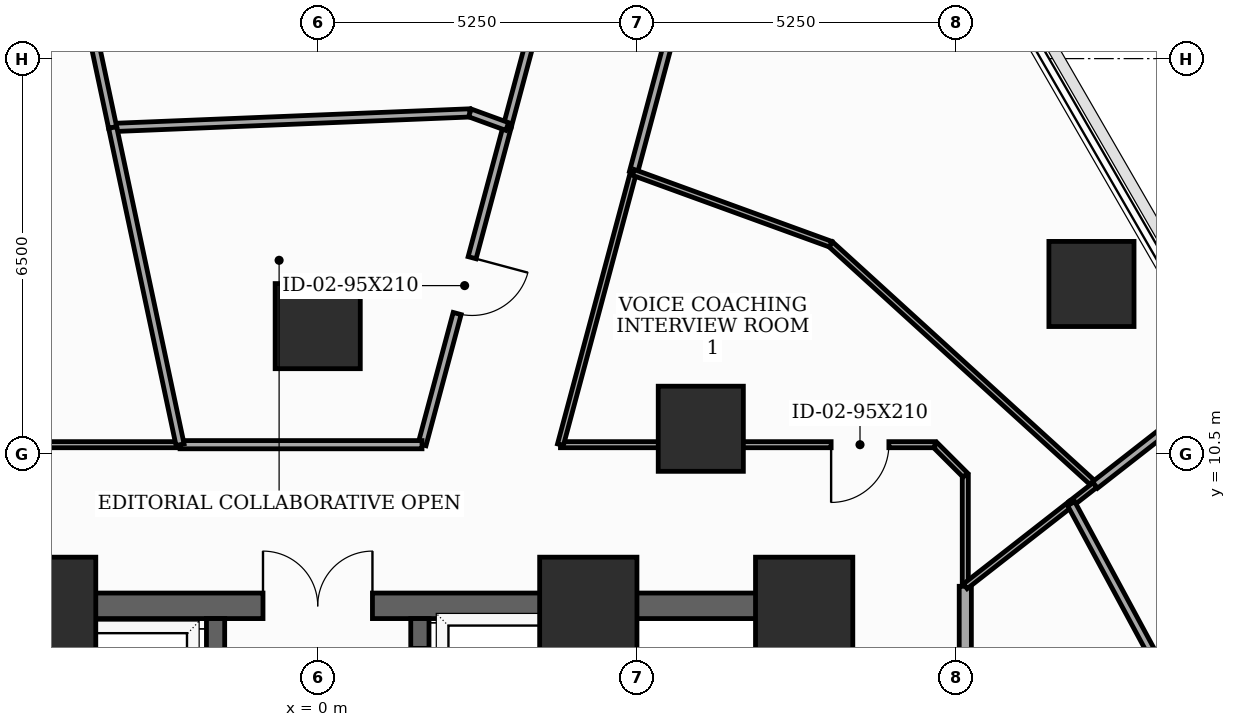
"""IFC4 building model, lengths in metres.
Left out: names, types, materials, properties, quantities, classifications, styles, units other than length and angle.
Written with IfcOpenShell. Run it as: python <this file> out.ifc"""

import sys

from ifc_helpers import new_model, si_unit, direction, frame, frame_2d, origin, origin_2d, place, context, subcontext, project, spatial, rectangle, extrude, element, fill, save


model = new_model("IFC4")
c1 = context("Model", 3, precision=1e-05, world=origin(), true_north=direction((0.0, 1.0)))
c2 = subcontext(c1, "Body", "Model", "MODEL_VIEW")
j1 = project(units=[si_unit("LENGTHUNIT", "METRE"), si_unit("PLANEANGLEUNIT", "RADIAN")], contexts=[c1])
p1 = place(None, origin())
s1 = spatial("IfcSite", under=j1, at=p1, CompositionType="ELEMENT")
p2 = place(p1, origin())
s2 = spatial("IfcBuilding", under=s1, at=p2, CompositionType="ELEMENT")
p3 = place(p2, frame((0.0, 0.0, 48.2)))
s3 = spatial("IfcBuildingStorey", under=s2, at=p3, CompositionType="ELEMENT", Elevation=48.2)
for number, where, z_axis, x_axis in (
    (1, (8.0, 8.0, 0.0), (0.0, 0.0, 1.0), (1.0, 0.0, 0.0)),
    (2, (4.45, 8.0, 0.0), (0.0, 0.0, 1.0), (1.0, 0.0, 0.0)),
    (3, (-4.45, 8.0, 0.0), (0.0, 0.0, 1.0), (1.0, 0.0, 0.0)),
):
    element("IfcColumn", number, at=place(p3, frame(where, z_axis=z_axis, x_axis=x_axis)), inside=s3, PredefinedType="COLUMN", context=c2, shape_type="SweptSolid", body=[
        extrude(rectangle(XDim=1.6, YDim=1.6, at=origin_2d()), origin(), (0.0, 0.0, 1.0), 3.7),
    ])
for number, where, z_axis, x_axis in (
    (4, (6.3, 10.912, 0.0), (0.0, 0.0, 1.0), (1.0, 0.0, 0.0)),
    (5, (0.0, 12.6, 0.0), (0.0, 0.0, 1.0), (1.0, 0.0, 0.0)),
    (6, (12.725, 13.293, 0.0), (0.0, 0.0, 1.0), (1.0, 0.0, 0.0)),
):
    element("IfcColumn", number, at=place(p3, frame(where, z_axis=z_axis, x_axis=x_axis)), inside=s3, PredefinedType="COLUMN", context=c2, shape_type="SweptSolid", body=[
        extrude(rectangle(XDim=1.4, YDim=1.4, at=origin_2d()), origin(), (0.0, 0.0, 1.0), 3.7),
    ])
p4 = place(p3, frame((8.0, -8.0, 0.0), z_axis=(0.0, 0.0, 1.0), x_axis=(0.0, 1.0, 0.0)))
e7 = element("IfcWall", 7, at=p4, inside=s3, PredefinedType="SHEAR", context=c2, shape_type="SweptSolid", body=[
    extrude(rectangle(XDim=16.0, YDim=0.42, at=frame_2d((8.0, 0.0))), origin(), (0.0, 0.0, 1.0), 3.5),
])
p5 = place(p4, frame((9.6, 0.0, 0.0)))
e8 = element("IfcOpeningElement", 8, at=p5, cuts=e7, PredefinedType="OPENING", context=c2, shape_type="SweptSolid", body=[
    extrude(rectangle(XDim=1.05, YDim=2.15, at=frame_2d((0.525, 1.075))), frame((0.0, 0.22, 0.0), z_axis=(0.0, -1.0, 0.0), x_axis=(1.0, 0.0, 0.0)), (0.0, 0.0, 1.0), 0.44),
])
p6 = place(p4, frame((14.148, 0.0, 0.0)))
e9 = element("IfcOpeningElement", 9, at=p6, cuts=e7, PredefinedType="OPENING", context=c2, shape_type="SweptSolid", body=[
    extrude(rectangle(XDim=0.85, YDim=2.02, at=frame_2d((0.425, 1.01))), frame((0.0, 0.22, 0.0), z_axis=(0.0, -1.0, 0.0), x_axis=(1.0, 0.0, 0.0)), (0.0, 0.0, 1.0), 0.44),
])
p7 = place(p3, frame((-8.0, 8.0, 0.0), z_axis=(0.0, 0.0, 1.0), x_axis=(1.0, 0.0, 0.0)))
e10 = element("IfcWall", 10, at=p7, inside=s3, PredefinedType="SHEAR", context=c2, shape_type="SweptSolid", body=[
    extrude(rectangle(XDim=16.0, YDim=0.42, at=frame_2d((8.0, 0.0))), origin(), (0.0, 0.0, 1.0), 3.5),
])
p8 = place(p7, frame((7.1, 0.0, 0.0)))
e11 = element("IfcOpeningElement", 11, at=p8, cuts=e10, PredefinedType="OPENING", context=c2, shape_type="SweptSolid", body=[
    extrude(rectangle(XDim=1.8, YDim=2.15, at=frame_2d((0.9, 1.075))), frame((0.0, 0.22, 0.0), z_axis=(0.0, -1.0, 0.0), x_axis=(1.0, 0.0, 0.0)), (0.0, 0.0, 1.0), 0.44),
])
for number, where, z_axis, x_axis in (
    (12, (-4.45, -7.79, 0.0), (0.0, 0.0, 1.0), (0.0, 1.0, 0.0)),
    (13, (4.45, -7.79, 0.0), (0.0, 0.0, 1.0), (0.0, 1.0, 0.0)),
):
    element("IfcWall", number, at=place(p3, frame(where, z_axis=z_axis, x_axis=x_axis)), inside=s3, PredefinedType="SHEAR", context=c2, shape_type="SweptSolid", body=[
        extrude(rectangle(XDim=15.58, YDim=0.3, at=frame_2d((7.79, 0.0))), origin(), (0.0, 0.0, 1.0), 3.5),
    ])
p9 = place(p3, frame((-1.68, -4.85, 0.0), z_axis=(0.0, 0.0, 1.0), x_axis=(0.0, 1.0, 0.0)))
e14 = element("IfcWall", 14, at=p9, inside=s3, PredefinedType="SHEAR", context=c2, shape_type="SweptSolid", body=[
    extrude(rectangle(XDim=12.64, YDim=0.3, at=frame_2d((6.32, 0.0))), origin(), (0.0, 0.0, 1.0), 3.5),
])
p10 = place(p9, frame((3.95, 0.0, 0.0)))
e15 = element("IfcOpeningElement", 15, at=p10, cuts=e14, PredefinedType="OPENING", context=c2, shape_type="SweptSolid", body=[
    extrude(rectangle(XDim=1.1, YDim=2.1, at=frame_2d((0.55, 1.05))), frame((0.0, 0.16, 0.0), z_axis=(0.0, -1.0, 0.0), x_axis=(1.0, 0.0, 0.0)), (0.0, 0.0, 1.0), 0.32),
])
p11 = place(p9, frame((6.25, 0.0, 0.0)))
e16 = element("IfcOpeningElement", 16, at=p11, cuts=e14, PredefinedType="OPENING", context=c2, shape_type="SweptSolid", body=[
    extrude(rectangle(XDim=1.1, YDim=2.1, at=frame_2d((0.55, 1.05))), frame((0.0, 0.16, 0.0), z_axis=(0.0, -1.0, 0.0), x_axis=(1.0, 0.0, 0.0)), (0.0, 0.0, 1.0), 0.32),
])
p12 = place(p9, frame((8.55, 0.0, 0.0)))
e17 = element("IfcOpeningElement", 17, at=p12, cuts=e14, PredefinedType="OPENING", context=c2, shape_type="SweptSolid", body=[
    extrude(rectangle(XDim=1.1, YDim=2.1, at=frame_2d((0.55, 1.05))), frame((0.0, 0.16, 0.0), z_axis=(0.0, -1.0, 0.0), x_axis=(1.0, 0.0, 0.0)), (0.0, 0.0, 1.0), 0.32),
])
p13 = place(p9, frame((10.85, 0.0, 0.0)))
e18 = element("IfcOpeningElement", 18, at=p13, cuts=e14, PredefinedType="OPENING", context=c2, shape_type="SweptSolid", body=[
    extrude(rectangle(XDim=1.1, YDim=2.1, at=frame_2d((0.55, 1.05))), frame((0.0, 0.16, 0.0), z_axis=(0.0, -1.0, 0.0), x_axis=(1.0, 0.0, 0.0)), (0.0, 0.0, 1.0), 0.32),
])
p14 = place(p9, frame((0.45, 0.0, 0.0)))
e19 = element("IfcOpeningElement", 19, at=p14, cuts=e14, PredefinedType="OPENING", context=c2, shape_type="SweptSolid", body=[
    extrude(rectangle(XDim=0.85, YDim=2.02, at=frame_2d((0.425, 1.01))), frame((0.0, 0.16, 0.0), z_axis=(0.0, -1.0, 0.0), x_axis=(1.0, 0.0, 0.0)), (0.0, 0.0, 1.0), 0.32),
])
p15 = place(p9, frame((2.05, 0.0, 0.0)))
e20 = element("IfcOpeningElement", 20, at=p15, cuts=e14, PredefinedType="OPENING", context=c2, shape_type="SweptSolid", body=[
    extrude(rectangle(XDim=0.85, YDim=2.02, at=frame_2d((0.425, 1.01))), frame((0.0, 0.16, 0.0), z_axis=(0.0, -1.0, 0.0), x_axis=(1.0, 0.0, 0.0)), (0.0, 0.0, 1.0), 0.32),
])
p16 = place(p3, frame((1.68, -4.85, 0.0), z_axis=(0.0, 0.0, 1.0), x_axis=(0.0, 1.0, 0.0)))
e21 = element("IfcWall", 21, at=p16, inside=s3, PredefinedType="SHEAR", context=c2, shape_type="SweptSolid", body=[
    extrude(rectangle(XDim=12.64, YDim=0.3, at=frame_2d((6.32, 0.0))), origin(), (0.0, 0.0, 1.0), 3.5),
])
p17 = place(p16, frame((0.55, 0.0, 0.0)))
e22 = element("IfcOpeningElement", 22, at=p17, cuts=e21, PredefinedType="OPENING", context=c2, shape_type="SweptSolid", body=[
    extrude(rectangle(XDim=1.1, YDim=2.1, at=frame_2d((0.55, 1.05))), frame((0.0, 0.16, 0.0), z_axis=(0.0, -1.0, 0.0), x_axis=(1.0, 0.0, 0.0)), (0.0, 0.0, 1.0), 0.32),
])
p18 = place(p16, frame((2.65, 0.0, 0.0)))
e23 = element("IfcOpeningElement", 23, at=p18, cuts=e21, PredefinedType="OPENING", context=c2, shape_type="SweptSolid", body=[
    extrude(rectangle(XDim=1.1, YDim=2.1, at=frame_2d((0.55, 1.05))), frame((0.0, 0.16, 0.0), z_axis=(0.0, -1.0, 0.0), x_axis=(1.0, 0.0, 0.0)), (0.0, 0.0, 1.0), 0.32),
])
p19 = place(p16, frame((4.75, 0.0, 0.0)))
e24 = element("IfcOpeningElement", 24, at=p19, cuts=e21, PredefinedType="OPENING", context=c2, shape_type="SweptSolid", body=[
    extrude(rectangle(XDim=1.1, YDim=2.1, at=frame_2d((0.55, 1.05))), frame((0.0, 0.16, 0.0), z_axis=(0.0, -1.0, 0.0), x_axis=(1.0, 0.0, 0.0)), (0.0, 0.0, 1.0), 0.32),
])
p20 = place(p16, frame((6.85, 0.0, 0.0)))
e25 = element("IfcOpeningElement", 25, at=p20, cuts=e21, PredefinedType="OPENING", context=c2, shape_type="SweptSolid", body=[
    extrude(rectangle(XDim=1.1, YDim=2.1, at=frame_2d((0.55, 1.05))), frame((0.0, 0.16, 0.0), z_axis=(0.0, -1.0, 0.0), x_axis=(1.0, 0.0, 0.0)), (0.0, 0.0, 1.0), 0.32),
])
p21 = place(p16, frame((8.95, 0.0, 0.0)))
e26 = element("IfcOpeningElement", 26, at=p21, cuts=e21, PredefinedType="OPENING", context=c2, shape_type="SweptSolid", body=[
    extrude(rectangle(XDim=1.1, YDim=2.1, at=frame_2d((0.55, 1.05))), frame((0.0, 0.16, 0.0), z_axis=(0.0, -1.0, 0.0), x_axis=(1.0, 0.0, 0.0)), (0.0, 0.0, 1.0), 0.32),
])
p22 = place(p16, frame((11.05, 0.0, 0.0)))
e27 = element("IfcOpeningElement", 27, at=p22, cuts=e21, PredefinedType="OPENING", context=c2, shape_type="SweptSolid", body=[
    extrude(rectangle(XDim=1.1, YDim=2.1, at=frame_2d((0.55, 1.05))), frame((0.0, 0.16, 0.0), z_axis=(0.0, -1.0, 0.0), x_axis=(1.0, 0.0, 0.0)), (0.0, 0.0, 1.0), 0.32),
])
p23 = place(p3, frame((10.65, 8.321, 0.0), z_axis=(0.0, 0.0, 1.0), x_axis=(0.0, 1.0, 0.0)))
e28 = element("IfcWall", 28, at=p23, inside=s3, PredefinedType="MOVABLE", context=c2, shape_type="SweptSolid", body=[
    extrude(rectangle(XDim=1.829, YDim=0.1, at=frame_2d((0.915, 0.0))), origin(), (0.0, 0.0, 1.0), 3.5),
])
p24 = place(p3, frame((10.65, 10.15, 0.0), z_axis=(0.0, 0.0, 1.0), x_axis=(-0.707106781187, 0.707106781187, 0.0)))
e29 = element("IfcWall", 29, at=p24, inside=s3, PredefinedType="MOVABLE", context=c2, shape_type="SweptSolid", body=[
    extrude(rectangle(XDim=0.707, YDim=0.1, at=frame_2d((0.354, 0.0))), origin(), (0.0, 0.0, 1.0), 3.5),
])
p25 = place(p3, frame((10.15, 10.65, 0.0), z_axis=(0.0, 0.0, 1.0), x_axis=(-1.0, 0.0, 0.0)))
e30 = element("IfcWall", 30, at=p25, inside=s3, PredefinedType="MOVABLE", context=c2, shape_type="SweptSolid", body=[
    extrude(rectangle(XDim=6.158, YDim=0.1, at=frame_2d((3.079, 0.0))), origin(), (0.0, 0.0, 1.0), 2.685),
])
p26 = place(p25, frame((0.757, 0.0, 0.0)))
e31 = element("IfcOpeningElement", 31, at=p26, cuts=e30, PredefinedType="OPENING", context=c2, shape_type="SweptSolid", body=[
    extrude(rectangle(XDim=0.95, YDim=2.1, at=frame_2d((0.475, 1.05))), frame((0.0, 0.06, 0.0), z_axis=(0.0, -1.0, 0.0), x_axis=(1.0, 0.0, 0.0)), (0.0, 0.0, 1.0), 0.12),
])
p27 = place(p3, frame((3.992, 10.65, 0.0), z_axis=(0.0, 0.0, 1.0), x_axis=(0.258832601786, 0.965922193685, 0.0)))
e32 = element("IfcWall", 32, at=p27, inside=s3, PredefinedType="MOVABLE", context=c2, shape_type="SweptSolid", body=[
    extrude(rectangle(XDim=4.636, YDim=0.1, at=frame_2d((2.318, 0.0))), origin(), (0.0, 0.0, 1.0), 2.785),
])
p28 = place(p3, frame((5.192, 15.128, 0.0), z_axis=(0.0, 0.0, 1.0), x_axis=(0.258929564275, 0.965896205989, 0.0)))
e33 = element("IfcWall", 33, at=p28, inside=s3, PredefinedType="PARTITIONING", context=c2, shape_type="SweptSolid", body=[
    extrude(rectangle(XDim=6.644, YDim=0.135, at=frame_2d((3.322, 0.0))), origin(), (0.0, 0.0, 1.0), 3.085),
])
p29 = place(p28, frame((2.847, 0.0, 0.0)))
e34 = element("IfcOpeningElement", 34, at=p29, cuts=e33, PredefinedType="OPENING", context=c2, shape_type="SweptSolid", body=[
    extrude(rectangle(XDim=0.95, YDim=2.1, at=frame_2d((0.475, 1.05))), frame((0.0, 0.077, 0.0), z_axis=(0.0, -1.0, 0.0), x_axis=(1.0, 0.0, 0.0)), (0.0, 0.0, 1.0), 0.155),
])
p30 = place(p3, frame((4.787, 22.115, 0.0), z_axis=(0.0, 0.0, 1.0), x_axis=(-0.25886596283, -0.965913253501, 0.0)))
e35 = element("IfcWall", 35, at=p30, inside=s3, PredefinedType="PARTITIONING", context=c2, shape_type="SweptSolid", body=[
    extrude(rectangle(XDim=6.452, YDim=0.135, at=frame_2d((3.226, 0.0))), origin(), (0.0, 0.0, 1.0), 2.935),
])
p31 = place(p3, frame((3.117, 15.883, 0.0), z_axis=(0.0, 0.0, 1.0), x_axis=(-0.258756357845, -0.965942621109, 0.0)))
e36 = element("IfcWall", 36, at=p31, inside=s3, PredefinedType="PARTITIONING", context=c2, shape_type="SweptSolid", body=[
    extrude(rectangle(XDim=5.418, YDim=0.135, at=frame_2d((2.709, 0.0))), origin(), (0.0, 0.0, 1.0), 2.785),
])
p32 = place(p31, frame((2.234, 0.0, 0.0)))
e37 = element("IfcOpeningElement", 37, at=p32, cuts=e36, PredefinedType="OPENING", context=c2, shape_type="SweptSolid", body=[
    extrude(rectangle(XDim=0.95, YDim=2.1, at=frame_2d((0.475, 1.05))), frame((0.0, 0.077, 0.0), z_axis=(0.0, -1.0, 0.0), x_axis=(1.0, 0.0, 0.0)), (0.0, 0.0, 1.0), 0.155),
])
p33 = place(p3, frame((1.715, 10.65, 0.0), z_axis=(0.0, 0.0, 1.0), x_axis=(-1.0, 0.0, 0.0)))
e38 = element("IfcWall", 38, at=p33, inside=s3, PredefinedType="PARTITIONING", context=c2, shape_type="SweptSolid", body=[
    extrude(rectangle(XDim=3.979, YDim=0.135, at=frame_2d((1.99, 0.0))), origin(), (0.0, 0.0, 1.0), 2.785),
])
p34 = place(p3, frame((10.65, -1.715, 0.0), z_axis=(0.0, 0.0, 1.0), x_axis=(0.0, 1.0, 0.0)))
e39 = element("IfcWall", 39, at=p34, inside=s3, PredefinedType="SOLIDWALL", context=c2, shape_type="SweptSolid", body=[
    extrude(rectangle(XDim=10.036, YDim=0.2, at=frame_2d((5.018, 0.0))), origin(), (0.0, 0.0, 1.0), 2.785),
])
p35 = place(p34, frame((4.543, 0.0, 0.0)))
e40 = element("IfcOpeningElement", 40, at=p35, cuts=e39, PredefinedType="OPENING", context=c2, shape_type="SweptSolid", body=[
    extrude(rectangle(XDim=0.95, YDim=2.1, at=frame_2d((0.475, 1.05))), frame((0.0, 0.11, 0.0), z_axis=(0.0, -1.0, 0.0), x_axis=(1.0, 0.0, 0.0)), (0.0, 0.0, 1.0), 0.22),
])
p36 = place(p3, frame((-2.264, 10.65, 0.0), z_axis=(0.0, 0.0, 1.0), x_axis=(-1.0, 0.0, 0.0)))
e41 = element("IfcWall", 41, at=p36, inside=s3, PredefinedType="MOVABLE", context=c2, shape_type="SweptSolid", body=[
    extrude(rectangle(XDim=7.886, YDim=0.1, at=frame_2d((3.943, 0.0))), origin(), (0.0, 0.0, 1.0), 2.685),
])
p37 = place(p3, frame((12.783, 9.987, 0.0), z_axis=(0.0, 0.0, 1.0), x_axis=(-0.739244565006, 0.6734370595, 0.0)))
e42 = element("IfcWall", 42, at=p37, inside=s3, PredefinedType="MOVABLE", context=c2, shape_type="SweptSolid", body=[
    extrude(rectangle(XDim=5.88, YDim=0.1, at=frame_2d((2.94, 0.0))), origin(), (0.0, 0.0, 1.0), 2.685),
])
p38 = place(p3, frame((8.436, 13.947, 0.0), z_axis=(0.0, 0.0, 1.0), x_axis=(-0.939679812385, 0.342055332067, 0.0)))
e43 = element("IfcWall", 43, at=p38, inside=s3, PredefinedType="MOVABLE", context=c2, shape_type="SweptSolid", body=[
    extrude(rectangle(XDim=3.452, YDim=0.1, at=frame_2d((1.726, 0.0))), origin(), (0.0, 0.0, 1.0), 2.685),
])
p39 = place(p3, frame((12.391, 9.681, 0.0), z_axis=(0.0, 0.0, 1.0), x_axis=(0.788002042991, 0.615672624243, 0.0)))
e44 = element("IfcWall", 44, at=p39, inside=s3, PredefinedType="MOVABLE", context=c2, shape_type="SweptSolid", body=[
    extrude(rectangle(XDim=0.497, YDim=0.1, at=frame_2d((0.249, 0.0))), origin(), (0.0, 0.0, 1.0), 3.5),
])
p40 = place(p3, frame((10.65, 8.321, 0.0), z_axis=(0.0, 0.0, 1.0), x_axis=(0.788124883644, 0.615515367624, 0.0)))
e45 = element("IfcWall", 45, at=p40, inside=s3, PredefinedType="MOVABLE", context=c2, shape_type="SweptSolid", body=[
    extrude(rectangle(XDim=2.209, YDim=0.1, at=frame_2d((1.104, 0.0))), origin(), (0.0, 0.0, 1.0), 3.085),
])
p41 = place(p3, frame((12.783, 9.987, 0.0), z_axis=(0.0, 0.0, 1.0), x_axis=(0.788064029995, 0.615593278576, 0.0)))
e46 = element("IfcWall", 46, at=p41, inside=s3, PredefinedType="PARTITIONING", context=c2, shape_type="SweptSolid", body=[
    extrude(rectangle(XDim=2.8, YDim=0.135, at=frame_2d((1.4, 0.0))), origin(), (0.0, 0.0, 1.0), 2.935),
])
p42 = place(p3, frame((-3.373, 15.867, 0.0), z_axis=(0.0, 0.0, 1.0), x_axis=(0.999166982533, 0.040808589988, 0.0)))
e47 = element("IfcWall", 47, at=p42, inside=s3, PredefinedType="PARTITIONING", context=c2, shape_type="SweptSolid", body=[
    extrude(rectangle(XDim=5.881, YDim=0.135, at=frame_2d((2.94, 0.0))), origin(), (0.0, 0.0, 1.0), 3.5),
])
p43 = place(p3, frame((2.503, 16.107, 0.0), z_axis=(0.0, 0.0, 1.0), x_axis=(0.93949859082, -0.342552766514, 0.0)))
e48 = element("IfcWall", 48, at=p43, inside=s3, PredefinedType="PARTITIONING", context=c2, shape_type="SweptSolid", body=[
    extrude(rectangle(XDim=0.654, YDim=0.135, at=frame_2d((0.327, 0.0))), origin(), (0.0, 0.0, 1.0), 3.5),
])
p44 = place(p3, frame((-5.854, 27.535, 0.0), z_axis=(0.0, 0.0, 1.0), x_axis=(0.207936838286, -0.978142255137, 0.0)))
e49 = element("IfcWall", 49, at=p44, inside=s3, PredefinedType="PARTITIONING", context=c2, shape_type="SweptSolid", body=[
    extrude(rectangle(XDim=11.929, YDim=0.135, at=frame_2d((5.964, 0.0))), origin(), (0.0, 0.0, 1.0), 2.935),
])
p45 = place(p3, frame((12.391, 9.681, 0.0), z_axis=(0.0, 0.0, 1.0), x_axis=(0.475181539821, -0.879887779329, 0.0)))
e50 = element("IfcWall", 50, at=p45, inside=s3, PredefinedType="PARTITIONING", context=c2, shape_type="SweptSolid", body=[
    extrude(rectangle(XDim=5.678, YDim=0.135, at=frame_2d((2.839, 0.0))), origin(), (0.0, 0.0, 1.0), 3.5),
])
p46 = place(p3, frame((-3.373, 15.867, 0.0), z_axis=(0.0, 0.0, 1.0), x_axis=(0.20795017925, -0.978139418974, 0.0)))
e51 = element("IfcWall", 51, at=p46, inside=s3, PredefinedType="PARTITIONING", context=c2, shape_type="SweptSolid", body=[
    extrude(rectangle(XDim=5.334, YDim=0.135, at=frame_2d((2.667, 0.0))), origin(), (0.0, 0.0, 1.0), 2.785),
])
p47 = place(p8, origin())
e52 = element("IfcDoor", 52, at=p47, inside=s3, OperationType="DOUBLE_DOOR_SINGLE_SWING", PredefinedType="DOOR", context=c2, shape_type="SweptSolid", body=[
    extrude(rectangle(XDim=1.8, YDim=2.15, at=frame_2d((0.9, 1.075))), frame((0.0, 0.025, 0.0), z_axis=(0.0, -1.0, 0.0), x_axis=(1.0, 0.0, 0.0)), (0.0, 0.0, 1.0), 0.05),
])
fill(e11, e52)
p48 = place(p26, origin())
e53 = element("IfcDoor", 53, at=p48, inside=s3, OperationType="SINGLE_SWING_RIGHT", PredefinedType="DOOR", context=c2, shape_type="SweptSolid", body=[
    extrude(rectangle(XDim=0.95, YDim=2.1, at=frame_2d((0.475, 1.05))), frame((0.0, 0.025, 0.0), z_axis=(0.0, -1.0, 0.0), x_axis=(1.0, 0.0, 0.0)), (0.0, 0.0, 1.0), 0.05),
])
fill(e31, e53)
p49 = place(p32, origin())
e54 = element("IfcDoor", 54, at=p49, inside=s3, OperationType="SINGLE_SWING_LEFT", PredefinedType="DOOR", context=c2, shape_type="SweptSolid", body=[
    extrude(rectangle(XDim=0.95, YDim=2.1, at=frame_2d((0.475, 1.05))), frame((0.0, 0.025, 0.0), z_axis=(0.0, -1.0, 0.0), x_axis=(1.0, 0.0, 0.0)), (0.0, 0.0, 1.0), 0.05),
])
fill(e37, e54)
save(model, sys.argv[1])
